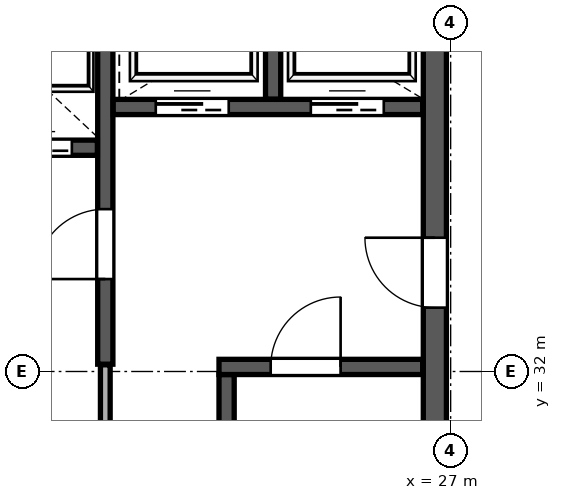
"""IFC4 building model, lengths in metres.
Left out: names, types, materials, properties, quantities, classifications, styles, units other than length and angle.
Written with IfcOpenShell. Run it as: python <this file> out.ifc"""

import sys

from ifc_helpers import new_model, si_unit, direction, frame, frame_2d, origin, place, context, subcontext, project, spatial, rectangle, extrude, source, transform, mapped, element, fill, save


model = new_model("IFC4")
c1 = context("Model", 3, precision=1e-05, world=origin(), true_north=direction((0.0, 1.0)))
c2 = subcontext(c1, "Body", "Model", "MODEL_VIEW")
j1 = project(units=[si_unit("LENGTHUNIT", "METRE"), si_unit("PLANEANGLEUNIT", "RADIAN")], contexts=[c1])
p1 = place(None, origin())
s1 = spatial("IfcSite", under=j1, at=p1, CompositionType="ELEMENT")
p2 = place(p1, origin())
s2 = spatial("IfcBuilding", under=s1, at=p2, CompositionType="ELEMENT")
p3 = place(p2, frame((0.0, 0.0, 349.2)))
s3 = spatial("IfcBuildingStorey", under=s2, at=p3, CompositionType="ELEMENT", Elevation=349.2)
p4 = place(p3, frame((26.74, 24.45, 0.0), z_axis=(0.0, 0.0, 1.0), x_axis=(0.0, 1.0, 0.0)))
e1 = element("IfcWall", 1, at=p4, inside=s3, PredefinedType="SHEAR", context=c2, shape_type="SweptSolid", body=[
    extrude(rectangle(XDim=15.1, YDim=0.38, at=frame_2d((7.55, 0.0))), origin(), (0.0, 0.0, 1.0), 5.76),
])
p5 = place(p4, frame((8.6, 0.0, 0.0)))
e2 = element("IfcOpeningElement", 2, at=p5, cuts=e1, PredefinedType="OPENING", context=c2, shape_type="SweptSolid", body=[
    extrude(rectangle(XDim=1.15, YDim=2.2, at=frame_2d((0.575, 1.1))), frame((0.0, 0.2, 0.0), z_axis=(0.0, -1.0, 0.0), x_axis=(1.0, 0.0, 0.0)), (0.0, 0.0, 1.0), 0.4),
])
p6 = place(p3, frame((23.315, 24.46, 0.0), z_axis=(0.0, 0.0, 1.0), x_axis=(0.0, 1.0, 0.0)))
e3 = element("IfcWall", 3, at=p6, inside=s3, PredefinedType="SHEAR", context=c2, shape_type="SweptSolid", body=[
    extrude(rectangle(XDim=7.49, YDim=0.25, at=frame_2d((3.745, 0.0))), origin(), (0.0, 0.0, 1.0), 5.76),
])
p7 = place(p3, frame((23.19, 32.075, 0.0), z_axis=(0.0, 0.0, 1.0), x_axis=(1.0, 0.0, 0.0)))
e4 = element("IfcWall", 4, at=p7, inside=s3, PredefinedType="SHEAR", context=c2, shape_type="SweptSolid", body=[
    extrude(rectangle(XDim=3.35, YDim=0.25, at=frame_2d((1.675, 0.0))), origin(), (0.0, 0.0, 1.0), 5.76),
])
p8 = place(p7, frame((0.85, 0.0, 0.0)))
e5 = element("IfcOpeningElement", 5, at=p8, cuts=e4, PredefinedType="OPENING", context=c2, shape_type="SweptSolid", body=[
    extrude(rectangle(XDim=1.15, YDim=2.2, at=frame_2d((0.575, 1.1))), frame((0.0, 0.135, 0.0), z_axis=(0.0, -1.0, 0.0), x_axis=(1.0, 0.0, 0.0)), (0.0, 0.0, 1.0), 0.27),
])
p9 = place(p3, frame((21.32, 32.12, 0.0), z_axis=(0.0, 0.0, 1.0), x_axis=(0.0, 1.0, 0.0)))
e6 = element("IfcWall", 6, at=p9, inside=s3, PredefinedType="SHEAR", context=c2, shape_type="SweptSolid", body=[
    extrude(rectangle(XDim=7.42, YDim=0.25, at=frame_2d((3.71, 0.0))), origin(), (0.0, 0.0, 1.0), 5.76),
])
p10 = place(p9, frame((1.4, 0.0, 0.0)))
e7 = element("IfcOpeningElement", 7, at=p10, cuts=e6, PredefinedType="OPENING", context=c2, shape_type="SweptSolid", body=[
    extrude(rectangle(XDim=1.15, YDim=2.2, at=frame_2d((0.575, 1.1))), frame((0.0, 0.135, 0.0), z_axis=(0.0, -1.0, 0.0), x_axis=(1.0, 0.0, 0.0)), (0.0, 0.0, 1.0), 0.27),
])
p11 = place(p3, frame((21.45, 36.35, 0.0), z_axis=(0.0, 0.0, 1.0), x_axis=(1.0, 0.0, 0.0)))
e8 = element("IfcWall", 8, at=p11, inside=s3, PredefinedType="SHEAR", context=c2, shape_type="SweptSolid", body=[
    extrude(rectangle(XDim=5.09, YDim=0.25, at=frame_2d((2.545, 0.0))), origin(), (0.0, 0.0, 1.0), 5.76),
])
p12 = place(p11, frame((0.7, 0.0, 0.0)))
e9 = element("IfcOpeningElement", 9, at=p12, cuts=e8, PredefinedType="OPENING", context=c2, shape_type="SweptSolid", body=[
    extrude(rectangle(XDim=1.2, YDim=2.2, at=frame_2d((0.6, 1.1))), frame((0.0, 0.135, 0.0), z_axis=(0.0, -1.0, 0.0), x_axis=(1.0, 0.0, 0.0)), (0.0, 0.0, 1.0), 0.27),
])
p13 = place(p11, frame((3.25, 0.0, 0.0)))
e10 = element("IfcOpeningElement", 10, at=p13, cuts=e8, PredefinedType="OPENING", context=c2, shape_type="SweptSolid", body=[
    extrude(rectangle(XDim=1.2, YDim=2.2, at=frame_2d((0.6, 1.1))), frame((0.0, 0.135, 0.0), z_axis=(0.0, -1.0, 0.0), x_axis=(1.0, 0.0, 0.0)), (0.0, 0.0, 1.0), 0.27),
])
p14 = place(p3, frame((24.08, 36.48, 0.0), z_axis=(0.0, 0.0, 1.0), x_axis=(0.0, 1.0, 0.0)))
e11 = element("IfcWall", 11, at=p14, inside=s3, PredefinedType="SHEAR", context=c2, shape_type="SweptSolid", body=[
    extrude(rectangle(XDim=3.06, YDim=0.25, at=frame_2d((1.53, 0.0))), origin(), (0.0, 0.0, 1.0), 5.76),
])
p15 = place(p3, frame((17.32, 35.68, 0.0), z_axis=(0.0, 0.0, 1.0), x_axis=(1.0, 0.0, 0.0)))
e12 = element("IfcWall", 12, at=p15, inside=s3, PredefinedType="SHEAR", context=c2, shape_type="SweptSolid", body=[
    extrude(rectangle(XDim=3.87, YDim=0.25, at=frame_2d((1.935, 0.0))), origin(), (0.0, 0.0, 1.0), 5.76),
])
p16 = place(p15, frame((0.45, 0.0, 0.0)))
e13 = element("IfcOpeningElement", 13, at=p16, cuts=e12, PredefinedType="OPENING", context=c2, shape_type="SweptSolid", body=[
    extrude(rectangle(XDim=1.1, YDim=2.2, at=frame_2d((0.55, 1.1))), frame((0.0, 0.135, 0.0), z_axis=(0.0, -1.0, 0.0), x_axis=(1.0, 0.0, 0.0)), (0.0, 0.0, 1.0), 0.27),
])
p17 = place(p15, frame((2.35, 0.0, 0.0)))
e14 = element("IfcOpeningElement", 14, at=p17, cuts=e12, PredefinedType="OPENING", context=c2, shape_type="SweptSolid", body=[
    extrude(rectangle(XDim=1.1, YDim=2.2, at=frame_2d((0.55, 1.1))), frame((0.0, 0.135, 0.0), z_axis=(0.0, -1.0, 0.0), x_axis=(1.0, 0.0, 0.0)), (0.0, 0.0, 1.0), 0.27),
])
p18 = place(p3, frame((21.32, 29.19, 0.0), z_axis=(0.0, 0.0, 1.0), x_axis=(0.0, 1.0, 0.0)))
e15 = element("IfcWall", 15, at=p18, inside=s3, PredefinedType="PARTITIONING", context=c2, shape_type="SweptSolid", body=[
    extrude(rectangle(XDim=2.92, YDim=0.16, at=frame_2d((1.46, 0.0))), origin(), (0.0, 0.0, 1.0), 5.76),
])
m1 = source(origin(), c2, "Body", "SweptSolid", [
    extrude(rectangle(XDim=1.15, YDim=2.2, at=frame_2d((0.575, 1.1))), frame((0.0, 0.025, 0.0), z_axis=(0.0, -1.0, 0.0), x_axis=(1.0, 0.0, 0.0)), (0.0, 0.0, 1.0), 0.05),
])
p19 = place(p10, origin())
e16 = element("IfcDoor", 16, at=p19, inside=s3, OperationType="SINGLE_SWING_LEFT", PredefinedType="DOOR", context=c2, shape_type="MappedRepresentation", body=[
    mapped(m1, transform((0.0, 0.0, 0.0), scale=1.0)),
])
fill(e7, e16)
m2 = source(origin(), c2, "Body", "SweptSolid", [
    extrude(rectangle(XDim=1.15, YDim=2.2, at=frame_2d((0.575, 1.1))), frame((0.0, 0.025, 0.0), z_axis=(0.0, -1.0, 0.0), x_axis=(1.0, 0.0, 0.0)), (0.0, 0.0, 1.0), 0.05),
])
p20 = place(p8, origin())
e17 = element("IfcDoor", 17, at=p20, inside=s3, OperationType="SINGLE_SWING_RIGHT", PredefinedType="DOOR", context=c2, shape_type="MappedRepresentation", body=[
    mapped(m2, transform((0.0, 0.0, 0.0), scale=1.0)),
])
fill(e5, e17)
p21 = place(p5, origin())
e18 = element("IfcDoor", 18, at=p21, inside=s3, OperationType="SINGLE_SWING_RIGHT", PredefinedType="DOOR", context=c2, shape_type="MappedRepresentation", body=[
    mapped(m1, transform((0.0, 0.0, 0.0), scale=1.0)),
])
fill(e2, e18)
m3 = source(origin(), c2, "Body", "SweptSolid", [
    extrude(rectangle(XDim=1.1, YDim=2.2, at=frame_2d((0.55, 1.1))), frame((0.0, 0.025, 0.0), z_axis=(0.0, -1.0, 0.0), x_axis=(1.0, 0.0, 0.0)), (0.0, 0.0, 1.0), 0.05),
])
p22 = place(p17, origin())
e19 = element("IfcDoor", 19, at=p22, inside=s3, OperationType="SLIDING_TO_RIGHT", PredefinedType="DOOR", context=c2, shape_type="MappedRepresentation", body=[
    mapped(m3, transform((0.0, 0.0, 0.0), scale=1.0)),
])
fill(e14, e19)
m4 = source(origin(), c2, "Body", "SweptSolid", [
    extrude(rectangle(XDim=1.2, YDim=2.2, at=frame_2d((0.6, 1.1))), frame((0.0, 0.025, 0.0), z_axis=(0.0, -1.0, 0.0), x_axis=(1.0, 0.0, 0.0)), (0.0, 0.0, 1.0), 0.05),
])
p23 = place(p12, origin())
e20 = element("IfcDoor", 20, at=p23, inside=s3, OperationType="SLIDING_TO_LEFT", PredefinedType="DOOR", context=c2, shape_type="MappedRepresentation", body=[
    mapped(m4, transform((0.0, 0.0, 0.0), scale=1.0)),
])
fill(e9, e20)
p24 = place(p13, origin())
e21 = element("IfcDoor", 21, at=p24, inside=s3, OperationType="SLIDING_TO_RIGHT", PredefinedType="DOOR", context=c2, shape_type="MappedRepresentation", body=[
    mapped(m4, transform((0.0, 0.0, 0.0), scale=1.0)),
])
fill(e10, e21)
save(model, sys.argv[1])
